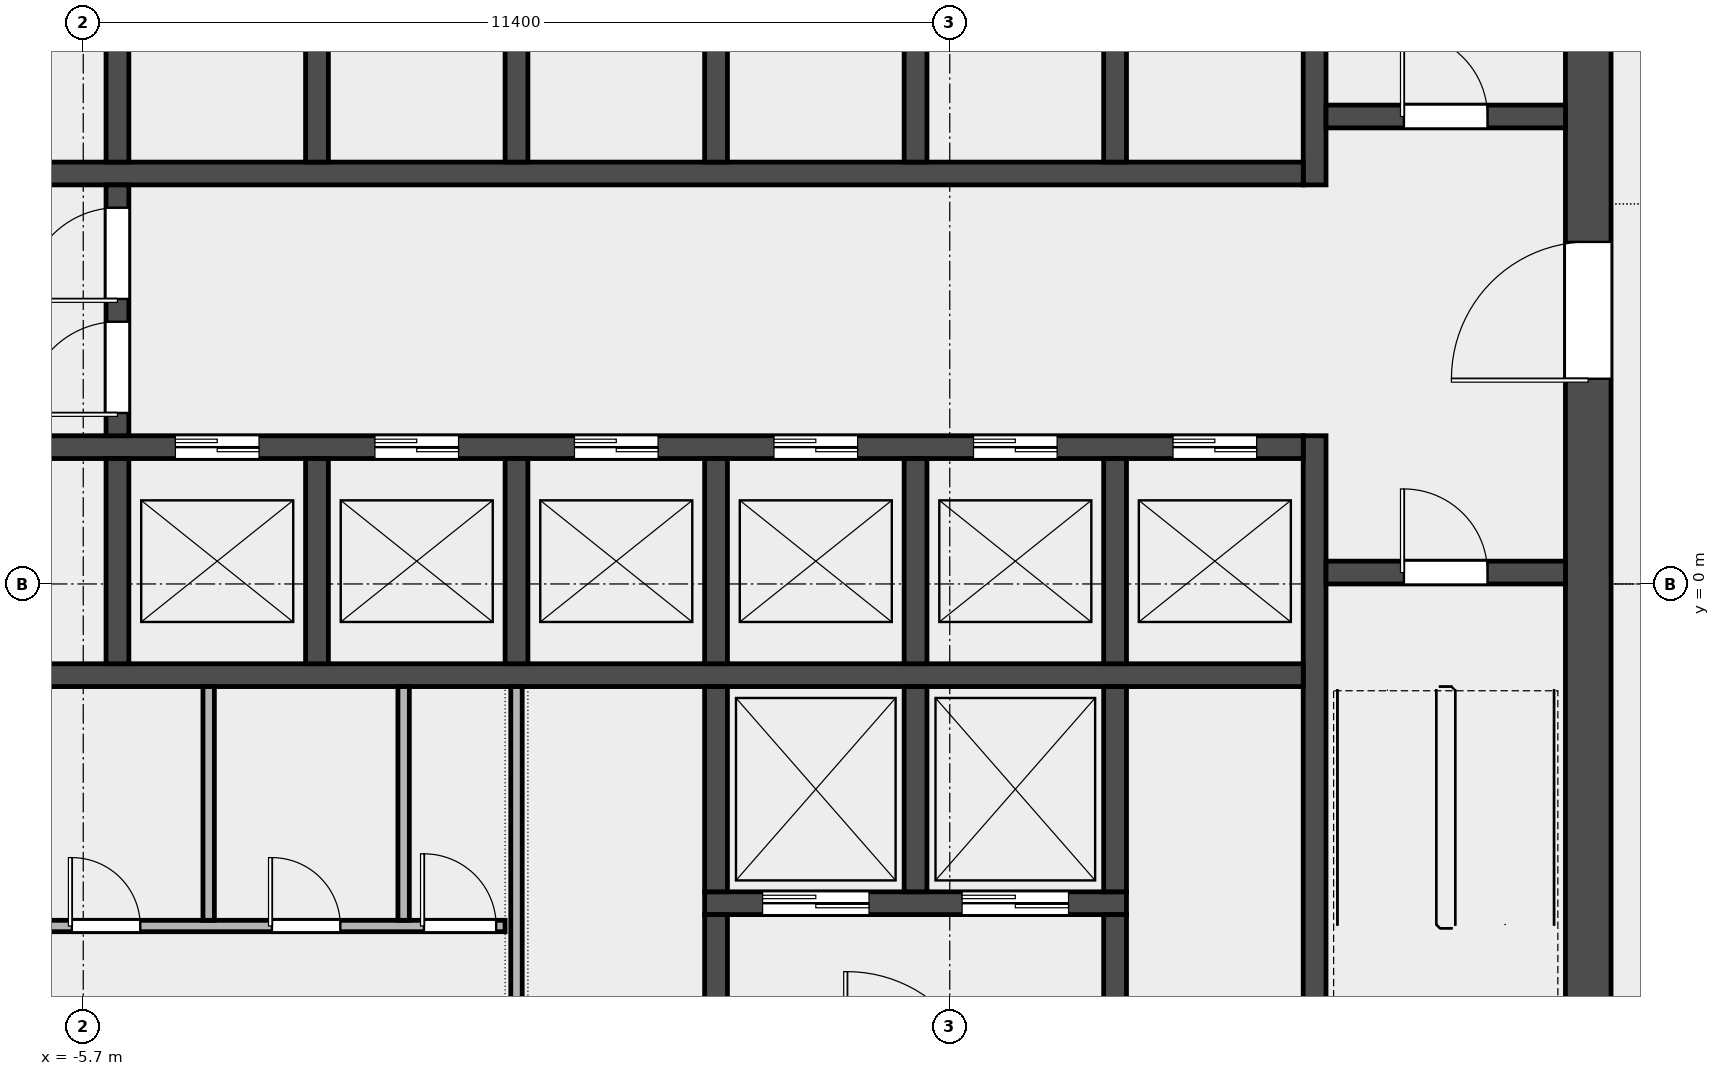
"""IFC4 building model, lengths in metres.
Left out: names, types, materials, properties, quantities, classifications, styles, units other than length and angle.
Written with IfcOpenShell. Run it as: python <this file> out.ifc"""

import sys

from ifc_helpers import new_model, si_unit, direction, frame, frame_2d, origin, place, context, subcontext, project, spatial, rectangle, extrude, element, fill, save


model = new_model("IFC4")
c1 = context("Model", 3, precision=1e-05, world=origin(), true_north=direction((0.0, 1.0)))
c2 = subcontext(c1, "Body", "Model", "MODEL_VIEW")
j1 = project(units=[si_unit("LENGTHUNIT", "METRE"), si_unit("PLANEANGLEUNIT", "RADIAN")], contexts=[c1])
p1 = place(None, origin())
s1 = spatial("IfcSite", under=j1, at=p1, CompositionType="ELEMENT")
p2 = place(p1, origin())
s2 = spatial("IfcBuilding", under=s1, at=p2, CompositionType="ELEMENT")
p3 = place(p2, frame((0.0, 0.0, 148.6)))
s3 = spatial("IfcBuildingStorey", under=s2, at=p3, CompositionType="ELEMENT", Elevation=148.6)
p4 = place(p3, frame((14.1, -6.6, 0.0), z_axis=(0.0, 0.0, 1.0), x_axis=(0.0, 1.0, 0.0)))
e1 = element("IfcWall", 1, at=p4, inside=s3, PredefinedType="SHEAR", context=c2, shape_type="SweptSolid", body=[
    extrude(rectangle(XDim=19.5, YDim=0.6, at=frame_2d((9.75, 0.0))), origin(), (0.0, 0.0, 1.0), 8.1),
])
p5 = place(p4, frame((9.3, 0.0, 0.0)))
e2 = element("IfcOpeningElement", 2, at=p5, cuts=e1, PredefinedType="OPENING", context=c2, shape_type="SweptSolid", body=[
    extrude(rectangle(XDim=1.8, YDim=2.1, at=frame_2d((0.9, 1.05))), frame((0.0, 0.312, 0.0), z_axis=(0.0, -1.0, 0.0), x_axis=(1.0, 0.0, 0.0)), (0.0, 0.0, 1.0), 0.624),
])
p6 = place(p3, frame((10.5, -6.6, 0.0), z_axis=(0.0, 0.0, 1.0), x_axis=(0.0, 1.0, 0.0)))
e3 = element("IfcWall", 3, at=p6, inside=s3, PredefinedType="SHEAR", context=c2, shape_type="SweptSolid", body=[
    extrude(rectangle(XDim=8.55, YDim=0.3, at=frame_2d((4.275, 0.0))), origin(), (0.0, 0.0, 1.0), 8.1),
])
p7 = place(p3, frame((10.5, 5.25, 0.0), z_axis=(0.0, 0.0, 1.0), x_axis=(0.0, 1.0, 0.0)))
e4 = element("IfcWall", 4, at=p7, inside=s3, PredefinedType="SHEAR", context=c2, shape_type="SweptSolid", body=[
    extrude(rectangle(XDim=7.65, YDim=0.3, at=frame_2d((3.825, 0.0))), origin(), (0.0, 0.0, 1.0), 8.1),
])
p8 = place(p3, frame((10.65, 0.15, 0.0), z_axis=(0.0, 0.0, 1.0), x_axis=(1.0, 0.0, 0.0)))
e5 = element("IfcWall", 5, at=p8, inside=s3, PredefinedType="SOLIDWALL", context=c2, shape_type="SweptSolid", body=[
    extrude(rectangle(XDim=3.15, YDim=0.3, at=frame_2d((1.575, 0.0))), origin(), (0.0, 0.0, 1.0), 8.1),
])
p9 = place(p8, frame((1.025, 0.0, 0.0)))
e6 = element("IfcOpeningElement", 6, at=p9, cuts=e5, PredefinedType="OPENING", context=c2, shape_type="SweptSolid", body=[
    extrude(rectangle(XDim=1.1, YDim=2.1, at=frame_2d((0.55, 1.05))), frame((0.0, 0.162, 0.0), z_axis=(0.0, -1.0, 0.0), x_axis=(1.0, 0.0, 0.0)), (0.0, 0.0, 1.0), 0.324),
])
p10 = place(p3, frame((10.65, 6.15, 0.0), z_axis=(0.0, 0.0, 1.0), x_axis=(1.0, 0.0, 0.0)))
e7 = element("IfcWall", 7, at=p10, inside=s3, PredefinedType="SOLIDWALL", context=c2, shape_type="SweptSolid", body=[
    extrude(rectangle(XDim=3.15, YDim=0.3, at=frame_2d((1.575, 0.0))), origin(), (0.0, 0.0, 1.0), 8.1),
])
p11 = place(p10, frame((1.025, 0.0, 0.0)))
e8 = element("IfcOpeningElement", 8, at=p11, cuts=e7, PredefinedType="OPENING", context=c2, shape_type="SweptSolid", body=[
    extrude(rectangle(XDim=1.1, YDim=2.1, at=frame_2d((0.55, 1.05))), frame((0.0, 0.162, 0.0), z_axis=(0.0, -1.0, 0.0), x_axis=(1.0, 0.0, 0.0)), (0.0, 0.0, 1.0), 0.324),
])
p12 = place(p3, frame((-10.35, -1.2, 0.0), z_axis=(0.0, 0.0, 1.0), x_axis=(1.0, 0.0, 0.0)))
e9 = element("IfcWall", 9, at=p12, inside=s3, PredefinedType="SOLIDWALL", context=c2, shape_type="SweptSolid", body=[
    extrude(rectangle(XDim=20.7, YDim=0.3, at=frame_2d((10.35, 0.0))), origin(), (0.0, 0.0, 1.0), 8.1),
])
p13 = place(p3, frame((-10.35, 1.8, 0.0), z_axis=(0.0, 0.0, 1.0), x_axis=(1.0, 0.0, 0.0)))
e10 = element("IfcWall", 10, at=p13, inside=s3, PredefinedType="SOLIDWALL", context=c2, shape_type="SweptSolid", body=[
    extrude(rectangle(XDim=20.7, YDim=0.3, at=frame_2d((10.35, 0.0))), origin(), (0.0, 0.0, 1.0), 8.1),
])
p14 = place(p13, frame((0.512, 0.0, 0.0)))
e11 = element("IfcOpeningElement", 11, at=p14, cuts=e10, PredefinedType="OPENING", context=c2, shape_type="SweptSolid", body=[
    extrude(rectangle(XDim=1.3, YDim=2.1, at=frame_2d((0.65, 1.05))), frame((0.0, 0.162, 0.0), z_axis=(0.0, -1.0, 0.0), x_axis=(1.0, 0.0, 0.0)), (0.0, 0.0, 1.0), 0.324),
])
p15 = place(p13, frame((5.863, 0.0, 0.0)))
e12 = element("IfcOpeningElement", 12, at=p15, cuts=e10, PredefinedType="OPENING", context=c2, shape_type="SweptSolid", body=[
    extrude(rectangle(XDim=1.1, YDim=2.1, at=frame_2d((0.55, 1.05))), frame((0.0, 0.162, 0.0), z_axis=(0.0, -1.0, 0.0), x_axis=(1.0, 0.0, 0.0)), (0.0, 0.0, 1.0), 0.324),
])
p16 = place(p13, frame((8.488, 0.0, 0.0)))
e13 = element("IfcOpeningElement", 13, at=p16, cuts=e10, PredefinedType="OPENING", context=c2, shape_type="SweptSolid", body=[
    extrude(rectangle(XDim=1.1, YDim=2.1, at=frame_2d((0.55, 1.05))), frame((0.0, 0.162, 0.0), z_axis=(0.0, -1.0, 0.0), x_axis=(1.0, 0.0, 0.0)), (0.0, 0.0, 1.0), 0.324),
])
p17 = place(p13, frame((11.113, 0.0, 0.0)))
e14 = element("IfcOpeningElement", 14, at=p17, cuts=e10, PredefinedType="OPENING", context=c2, shape_type="SweptSolid", body=[
    extrude(rectangle(XDim=1.1, YDim=2.1, at=frame_2d((0.55, 1.05))), frame((0.0, 0.162, 0.0), z_axis=(0.0, -1.0, 0.0), x_axis=(1.0, 0.0, 0.0)), (0.0, 0.0, 1.0), 0.324),
])
p18 = place(p13, frame((13.738, 0.0, 0.0)))
e15 = element("IfcOpeningElement", 15, at=p18, cuts=e10, PredefinedType="OPENING", context=c2, shape_type="SweptSolid", body=[
    extrude(rectangle(XDim=1.1, YDim=2.1, at=frame_2d((0.55, 1.05))), frame((0.0, 0.162, 0.0), z_axis=(0.0, -1.0, 0.0), x_axis=(1.0, 0.0, 0.0)), (0.0, 0.0, 1.0), 0.324),
])
p19 = place(p13, frame((16.363, 0.0, 0.0)))
e16 = element("IfcOpeningElement", 16, at=p19, cuts=e10, PredefinedType="OPENING", context=c2, shape_type="SweptSolid", body=[
    extrude(rectangle(XDim=1.1, YDim=2.1, at=frame_2d((0.55, 1.05))), frame((0.0, 0.162, 0.0), z_axis=(0.0, -1.0, 0.0), x_axis=(1.0, 0.0, 0.0)), (0.0, 0.0, 1.0), 0.324),
])
p20 = place(p13, frame((18.988, 0.0, 0.0)))
e17 = element("IfcOpeningElement", 17, at=p20, cuts=e10, PredefinedType="OPENING", context=c2, shape_type="SweptSolid", body=[
    extrude(rectangle(XDim=1.1, YDim=2.1, at=frame_2d((0.55, 1.05))), frame((0.0, 0.162, 0.0), z_axis=(0.0, -1.0, 0.0), x_axis=(1.0, 0.0, 0.0)), (0.0, 0.0, 1.0), 0.324),
])
p21 = place(p3, frame((-10.35, 5.4, 0.0), z_axis=(0.0, 0.0, 1.0), x_axis=(1.0, 0.0, 0.0)))
e18 = element("IfcWall", 18, at=p21, inside=s3, PredefinedType="SOLIDWALL", context=c2, shape_type="SweptSolid", body=[
    extrude(rectangle(XDim=20.7, YDim=0.3, at=frame_2d((10.35, 0.0))), origin(), (0.0, 0.0, 1.0), 8.1),
])
p22 = place(p21, frame((0.512, 0.0, 0.0)))
e19 = element("IfcOpeningElement", 19, at=p22, cuts=e18, PredefinedType="OPENING", context=c2, shape_type="SweptSolid", body=[
    extrude(rectangle(XDim=1.3, YDim=2.1, at=frame_2d((0.65, 1.05))), frame((0.0, 0.162, 0.0), z_axis=(0.0, -1.0, 0.0), x_axis=(1.0, 0.0, 0.0)), (0.0, 0.0, 1.0), 0.324),
])
for number, where, z_axis, x_axis in (
    (20, (-5.25, -1.05, 0.0), (0.0, 0.0, 1.0), (0.0, 1.0, 0.0)),
    (21, (-2.625, -1.05, 0.0), (0.0, 0.0, 1.0), (0.0, 1.0, 0.0)),
    (22, (0.0, -1.05, 0.0), (0.0, 0.0, 1.0), (0.0, 1.0, 0.0)),
    (23, (2.625, -1.05, 0.0), (0.0, 0.0, 1.0), (0.0, 1.0, 0.0)),
    (24, (5.25, -1.05, 0.0), (0.0, 0.0, 1.0), (0.0, 1.0, 0.0)),
    (25, (7.875, -1.05, 0.0), (0.0, 0.0, 1.0), (0.0, 1.0, 0.0)),
    (26, (-5.25, 5.55, 0.0), (0.0, 0.0, 1.0), (0.0, 1.0, 0.0)),
    (27, (-2.625, 5.55, 0.0), (0.0, 0.0, 1.0), (0.0, 1.0, 0.0)),
    (28, (0.0, 5.55, 0.0), (0.0, 0.0, 1.0), (0.0, 1.0, 0.0)),
    (29, (2.625, 5.55, 0.0), (0.0, 0.0, 1.0), (0.0, 1.0, 0.0)),
    (30, (5.25, 5.55, 0.0), (0.0, 0.0, 1.0), (0.0, 1.0, 0.0)),
    (31, (7.875, 5.55, 0.0), (0.0, 0.0, 1.0), (0.0, 1.0, 0.0)),
):
    element("IfcWall", number, at=place(p3, frame(where, z_axis=z_axis, x_axis=x_axis)), inside=s3, PredefinedType="SOLIDWALL", context=c2, shape_type="SweptSolid", body=[
        extrude(rectangle(XDim=2.7, YDim=0.3, at=frame_2d((1.35, 0.0))), origin(), (0.0, 0.0, 1.0), 8.1),
    ])
p23 = place(p3, frame((-5.25, 1.95, 0.0), z_axis=(0.0, 0.0, 1.0), x_axis=(0.0, 1.0, 0.0)))
e32 = element("IfcWall", 32, at=p23, inside=s3, PredefinedType="SOLIDWALL", context=c2, shape_type="SweptSolid", body=[
    extrude(rectangle(XDim=3.3, YDim=0.3, at=frame_2d((1.65, 0.0))), origin(), (0.0, 0.0, 1.0), 8.1),
])
p24 = place(p23, frame((0.3, 0.0, 0.0)))
e33 = element("IfcOpeningElement", 33, at=p24, cuts=e32, PredefinedType="OPENING", context=c2, shape_type="SweptSolid", body=[
    extrude(rectangle(XDim=1.2, YDim=2.1, at=frame_2d((0.6, 1.05))), frame((0.0, 0.162, 0.0), z_axis=(0.0, -1.0, 0.0), x_axis=(1.0, 0.0, 0.0)), (0.0, 0.0, 1.0), 0.324),
])
p25 = place(p23, frame((1.8, 0.0, 0.0)))
e34 = element("IfcOpeningElement", 34, at=p25, cuts=e32, PredefinedType="OPENING", context=c2, shape_type="SweptSolid", body=[
    extrude(rectangle(XDim=1.2, YDim=2.1, at=frame_2d((0.6, 1.05))), frame((0.0, 0.162, 0.0), z_axis=(0.0, -1.0, 0.0), x_axis=(1.0, 0.0, 0.0)), (0.0, 0.0, 1.0), 0.324),
])
p26 = place(p3, frame((2.475, -4.2, 0.0), z_axis=(0.0, 0.0, 1.0), x_axis=(1.0, 0.0, 0.0)))
e35 = element("IfcWall", 35, at=p26, inside=s3, PredefinedType="SOLIDWALL", context=c2, shape_type="SweptSolid", body=[
    extrude(rectangle(XDim=5.55, YDim=0.3, at=frame_2d((2.775, 0.0))), origin(), (0.0, 0.0, 1.0), 8.1),
])
p27 = place(p26, frame((0.762, 0.0, 0.0)))
e36 = element("IfcOpeningElement", 36, at=p27, cuts=e35, PredefinedType="OPENING", context=c2, shape_type="SweptSolid", body=[
    extrude(rectangle(XDim=1.4, YDim=2.1, at=frame_2d((0.7, 1.05))), frame((0.0, 0.162, 0.0), z_axis=(0.0, -1.0, 0.0), x_axis=(1.0, 0.0, 0.0)), (0.0, 0.0, 1.0), 0.324),
])
p28 = place(p26, frame((3.387, 0.0, 0.0)))
e37 = element("IfcOpeningElement", 37, at=p28, cuts=e35, PredefinedType="OPENING", context=c2, shape_type="SweptSolid", body=[
    extrude(rectangle(XDim=1.4, YDim=2.1, at=frame_2d((0.7, 1.05))), frame((0.0, 0.162, 0.0), z_axis=(0.0, -1.0, 0.0), x_axis=(1.0, 0.0, 0.0)), (0.0, 0.0, 1.0), 0.324),
])
p29 = place(p3, frame((2.625, -4.05, 0.0), z_axis=(0.0, 0.0, 1.0), x_axis=(0.0, 1.0, 0.0)))
e38 = element("IfcWall", 38, at=p29, inside=s3, PredefinedType="SOLIDWALL", context=c2, shape_type="SweptSolid", body=[
    extrude(rectangle(XDim=2.7, YDim=0.3, at=frame_2d((1.35, 0.0))), origin(), (0.0, 0.0, 1.0), 8.1),
])
p30 = place(p3, frame((2.625, -6.6, 0.0), z_axis=(0.0, 0.0, 1.0), x_axis=(0.0, 1.0, 0.0)))
e39 = element("IfcWall", 39, at=p30, inside=s3, PredefinedType="SOLIDWALL", context=c2, shape_type="SweptSolid", body=[
    extrude(rectangle(XDim=2.25, YDim=0.3, at=frame_2d((1.125, 0.0))), origin(), (0.0, 0.0, 1.0), 8.1),
])
for number, where, z_axis, x_axis in (
    (40, (5.25, -4.05, 0.0), (0.0, 0.0, 1.0), (0.0, 1.0, 0.0)),
    (41, (7.875, -4.05, 0.0), (0.0, 0.0, 1.0), (0.0, 1.0, 0.0)),
):
    element("IfcWall", number, at=place(p3, frame(where, z_axis=z_axis, x_axis=x_axis)), inside=s3, PredefinedType="SOLIDWALL", context=c2, shape_type="SweptSolid", body=[
        extrude(rectangle(XDim=2.7, YDim=0.3, at=frame_2d((1.35, 0.0))), origin(), (0.0, 0.0, 1.0), 8.1),
    ])
p31 = place(p3, frame((7.875, -6.6, 0.0), z_axis=(0.0, 0.0, 1.0), x_axis=(0.0, 1.0, 0.0)))
e42 = element("IfcWall", 42, at=p31, inside=s3, PredefinedType="SOLIDWALL", context=c2, shape_type="SweptSolid", body=[
    extrude(rectangle(XDim=2.25, YDim=0.3, at=frame_2d((1.125, 0.0))), origin(), (0.0, 0.0, 1.0), 8.1),
])
p32 = place(p3, frame((-6.675, -4.5, 0.0), z_axis=(0.0, 0.0, 1.0), x_axis=(1.0, 0.0, 0.0)))
e43 = element("IfcWall", 43, at=p32, inside=s3, PredefinedType="PARTITIONING", context=c2, shape_type="SweptSolid", body=[
    extrude(rectangle(XDim=6.525, YDim=0.15, at=frame_2d((3.263, 0.0))), origin(), (0.0, 0.0, 1.0), 8.1),
])
p33 = place(p32, frame((0.825, 0.0, 0.0)))
e44 = element("IfcOpeningElement", 44, at=p33, cuts=e43, PredefinedType="OPENING", context=c2, shape_type="SweptSolid", body=[
    extrude(rectangle(XDim=0.9, YDim=2.1, at=frame_2d((0.45, 1.05))), frame((0.0, 0.087, 0.0), z_axis=(0.0, -1.0, 0.0), x_axis=(1.0, 0.0, 0.0)), (0.0, 0.0, 1.0), 0.174),
])
p34 = place(p32, frame((3.458, 0.0, 0.0)))
e45 = element("IfcOpeningElement", 45, at=p34, cuts=e43, PredefinedType="OPENING", context=c2, shape_type="SweptSolid", body=[
    extrude(rectangle(XDim=0.9, YDim=2.1, at=frame_2d((0.45, 1.05))), frame((0.0, 0.087, 0.0), z_axis=(0.0, -1.0, 0.0), x_axis=(1.0, 0.0, 0.0)), (0.0, 0.0, 1.0), 0.174),
])
p35 = place(p32, frame((5.458, 0.0, 0.0)))
e46 = element("IfcOpeningElement", 46, at=p35, cuts=e43, PredefinedType="OPENING", context=c2, shape_type="SweptSolid", body=[
    extrude(rectangle(XDim=0.95, YDim=2.1, at=frame_2d((0.475, 1.05))), frame((0.0, 0.087, 0.0), z_axis=(0.0, -1.0, 0.0), x_axis=(1.0, 0.0, 0.0)), (0.0, 0.0, 1.0), 0.174),
])
for number, where, z_axis, x_axis in (
    (47, (-4.05, -4.425, 0.0), (0.0, 0.0, 1.0), (0.0, 1.0, 0.0)),
    (48, (-1.485, -4.425, 0.0), (0.0, 0.0, 1.0), (0.0, 1.0, 0.0)),
):
    element("IfcWall", number, at=place(p3, frame(where, z_axis=z_axis, x_axis=x_axis)), inside=s3, PredefinedType="PARTITIONING", context=c2, shape_type="SweptSolid", body=[
        extrude(rectangle(XDim=3.075, YDim=0.15, at=frame_2d((1.538, 0.0))), origin(), (0.0, 0.0, 1.0), 8.1),
    ])
p36 = place(p3, frame((0.0, -6.6, 0.0), z_axis=(0.0, 0.0, 1.0), x_axis=(0.0, 1.0, 0.0)))
e49 = element("IfcWall", 49, at=p36, inside=s3, PredefinedType="PARTITIONING", context=c2, shape_type="SweptSolid", body=[
    extrude(rectangle(XDim=5.25, YDim=0.15, at=frame_2d((2.625, 0.0))), origin(), (0.0, 0.0, 1.0), 8.1),
])
p37 = place(p9, origin())
e50 = element("IfcDoor", 50, at=p37, inside=s3, OperationType="SINGLE_SWING_RIGHT", PredefinedType="DOOR", context=c2, shape_type="SweptSolid", body=[
    extrude(rectangle(XDim=1.1, YDim=2.1, at=frame_2d((0.55, 1.05))), frame((0.0, 0.025, 0.0), z_axis=(0.0, -1.0, 0.0), x_axis=(1.0, 0.0, 0.0)), (0.0, 0.0, 1.0), 0.05),
])
fill(e6, e50)
p38 = place(p11, origin())
e51 = element("IfcDoor", 51, at=p38, inside=s3, OperationType="SINGLE_SWING_RIGHT", PredefinedType="DOOR", context=c2, shape_type="SweptSolid", body=[
    extrude(rectangle(XDim=1.1, YDim=2.1, at=frame_2d((0.55, 1.05))), frame((0.0, 0.025, 0.0), z_axis=(0.0, -1.0, 0.0), x_axis=(1.0, 0.0, 0.0)), (0.0, 0.0, 1.0), 0.05),
])
fill(e8, e51)
p39 = place(p5, origin())
e52 = element("IfcDoor", 52, at=p39, inside=s3, OperationType="DOUBLE_DOOR_SINGLE_SWING", PredefinedType="DOOR", context=c2, shape_type="SweptSolid", body=[
    extrude(rectangle(XDim=1.8, YDim=2.1, at=frame_2d((0.9, 1.05))), frame((0.0, 0.025, 0.0), z_axis=(0.0, -1.0, 0.0), x_axis=(1.0, 0.0, 0.0)), (0.0, 0.0, 1.0), 0.05),
])
fill(e2, e52)
p40 = place(p24, origin())
e53 = element("IfcDoor", 53, at=p40, inside=s3, OperationType="SINGLE_SWING_LEFT", PredefinedType="DOOR", context=c2, shape_type="SweptSolid", body=[
    extrude(rectangle(XDim=1.2, YDim=2.1, at=frame_2d((0.6, 1.05))), frame((0.0, 0.025, 0.0), z_axis=(0.0, -1.0, 0.0), x_axis=(1.0, 0.0, 0.0)), (0.0, 0.0, 1.0), 0.05),
])
fill(e33, e53)
p41 = place(p25, origin())
e54 = element("IfcDoor", 54, at=p41, inside=s3, OperationType="SINGLE_SWING_RIGHT", PredefinedType="DOOR", context=c2, shape_type="SweptSolid", body=[
    extrude(rectangle(XDim=1.2, YDim=2.1, at=frame_2d((0.6, 1.05))), frame((0.0, 0.025, 0.0), z_axis=(0.0, -1.0, 0.0), x_axis=(1.0, 0.0, 0.0)), (0.0, 0.0, 1.0), 0.05),
])
fill(e34, e54)
p42 = place(p15, origin())
e55 = element("IfcDoor", 55, at=p42, inside=s3, OperationType="DOUBLE_DOOR_SLIDING", PredefinedType="DOOR", context=c2, shape_type="SweptSolid", body=[
    extrude(rectangle(XDim=1.1, YDim=2.1, at=frame_2d((0.55, 1.05))), frame((0.0, 0.025, 0.0), z_axis=(0.0, -1.0, 0.0), x_axis=(1.0, 0.0, 0.0)), (0.0, 0.0, 1.0), 0.05),
])
fill(e12, e55)
p43 = place(p16, origin())
e56 = element("IfcDoor", 56, at=p43, inside=s3, OperationType="DOUBLE_DOOR_SLIDING", PredefinedType="DOOR", context=c2, shape_type="SweptSolid", body=[
    extrude(rectangle(XDim=1.1, YDim=2.1, at=frame_2d((0.55, 1.05))), frame((0.0, 0.025, 0.0), z_axis=(0.0, -1.0, 0.0), x_axis=(1.0, 0.0, 0.0)), (0.0, 0.0, 1.0), 0.05),
])
fill(e13, e56)
p44 = place(p17, origin())
e57 = element("IfcDoor", 57, at=p44, inside=s3, OperationType="DOUBLE_DOOR_SLIDING", PredefinedType="DOOR", context=c2, shape_type="SweptSolid", body=[
    extrude(rectangle(XDim=1.1, YDim=2.1, at=frame_2d((0.55, 1.05))), frame((0.0, 0.025, 0.0), z_axis=(0.0, -1.0, 0.0), x_axis=(1.0, 0.0, 0.0)), (0.0, 0.0, 1.0), 0.05),
])
fill(e14, e57)
p45 = place(p18, origin())
e58 = element("IfcDoor", 58, at=p45, inside=s3, OperationType="DOUBLE_DOOR_SLIDING", PredefinedType="DOOR", context=c2, shape_type="SweptSolid", body=[
    extrude(rectangle(XDim=1.1, YDim=2.1, at=frame_2d((0.55, 1.05))), frame((0.0, 0.025, 0.0), z_axis=(0.0, -1.0, 0.0), x_axis=(1.0, 0.0, 0.0)), (0.0, 0.0, 1.0), 0.05),
])
fill(e15, e58)
p46 = place(p19, origin())
e59 = element("IfcDoor", 59, at=p46, inside=s3, OperationType="DOUBLE_DOOR_SLIDING", PredefinedType="DOOR", context=c2, shape_type="SweptSolid", body=[
    extrude(rectangle(XDim=1.1, YDim=2.1, at=frame_2d((0.55, 1.05))), frame((0.0, 0.025, 0.0), z_axis=(0.0, -1.0, 0.0), x_axis=(1.0, 0.0, 0.0)), (0.0, 0.0, 1.0), 0.05),
])
fill(e16, e59)
p47 = place(p20, origin())
e60 = element("IfcDoor", 60, at=p47, inside=s3, OperationType="DOUBLE_DOOR_SLIDING", PredefinedType="DOOR", context=c2, shape_type="SweptSolid", body=[
    extrude(rectangle(XDim=1.1, YDim=2.1, at=frame_2d((0.55, 1.05))), frame((0.0, 0.025, 0.0), z_axis=(0.0, -1.0, 0.0), x_axis=(1.0, 0.0, 0.0)), (0.0, 0.0, 1.0), 0.05),
])
fill(e17, e60)
p48 = place(p27, origin())
e61 = element("IfcDoor", 61, at=p48, inside=s3, OperationType="DOUBLE_DOOR_SLIDING", PredefinedType="DOOR", context=c2, shape_type="SweptSolid", body=[
    extrude(rectangle(XDim=1.4, YDim=2.1, at=frame_2d((0.7, 1.05))), frame((0.0, 0.025, 0.0), z_axis=(0.0, -1.0, 0.0), x_axis=(1.0, 0.0, 0.0)), (0.0, 0.0, 1.0), 0.05),
])
fill(e36, e61)
p49 = place(p28, origin())
e62 = element("IfcDoor", 62, at=p49, inside=s3, OperationType="DOUBLE_DOOR_SLIDING", PredefinedType="DOOR", context=c2, shape_type="SweptSolid", body=[
    extrude(rectangle(XDim=1.4, YDim=2.1, at=frame_2d((0.7, 1.05))), frame((0.0, 0.025, 0.0), z_axis=(0.0, -1.0, 0.0), x_axis=(1.0, 0.0, 0.0)), (0.0, 0.0, 1.0), 0.05),
])
fill(e37, e62)
p50 = place(p33, origin())
e63 = element("IfcDoor", 63, at=p50, inside=s3, OperationType="SINGLE_SWING_LEFT", PredefinedType="DOOR", context=c2, shape_type="SweptSolid", body=[
    extrude(rectangle(XDim=0.9, YDim=2.1, at=frame_2d((0.45, 1.05))), frame((0.0, 0.025, 0.0), z_axis=(0.0, -1.0, 0.0), x_axis=(1.0, 0.0, 0.0)), (0.0, 0.0, 1.0), 0.05),
])
fill(e44, e63)
p51 = place(p34, origin())
e64 = element("IfcDoor", 64, at=p51, inside=s3, OperationType="SINGLE_SWING_LEFT", PredefinedType="DOOR", context=c2, shape_type="SweptSolid", body=[
    extrude(rectangle(XDim=0.9, YDim=2.1, at=frame_2d((0.45, 1.05))), frame((0.0, 0.025, 0.0), z_axis=(0.0, -1.0, 0.0), x_axis=(1.0, 0.0, 0.0)), (0.0, 0.0, 1.0), 0.05),
])
fill(e45, e64)
p52 = place(p35, origin())
e65 = element("IfcDoor", 65, at=p52, inside=s3, OperationType="SINGLE_SWING_LEFT", PredefinedType="DOOR", context=c2, shape_type="SweptSolid", body=[
    extrude(rectangle(XDim=0.95, YDim=2.1, at=frame_2d((0.475, 1.05))), frame((0.0, 0.025, 0.0), z_axis=(0.0, -1.0, 0.0), x_axis=(1.0, 0.0, 0.0)), (0.0, 0.0, 1.0), 0.05),
])
fill(e46, e65)
save(model, sys.argv[1])
